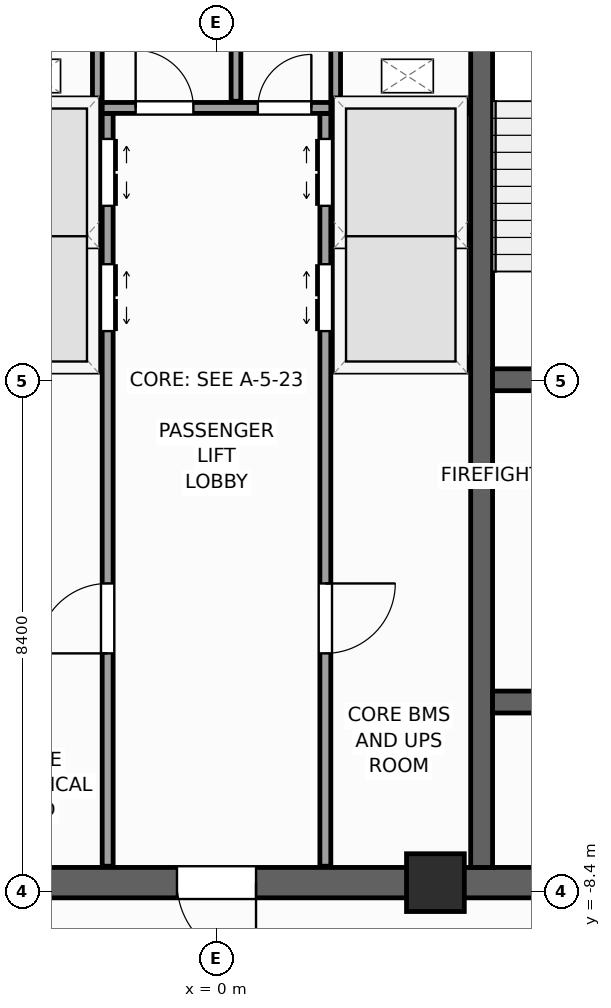
"""IFC4 building model, lengths in metres.
Left out: names, types, materials, properties, quantities, classifications, styles, units other than length and angle.
Written with IfcOpenShell. Run it as: python <this file> out.ifc"""

import sys

from ifc_helpers import new_model, si_unit, direction, frame, frame_2d, origin, origin_2d, place, context, subcontext, project, spatial, rectangle, extrude, source, transform, mapped, element, fill, save


model = new_model("IFC4")
c1 = context("Model", 3, precision=1e-05, world=origin(), true_north=direction((0.0, 1.0)))
c2 = subcontext(c1, "Body", "Model", "MODEL_VIEW")
j1 = project(units=[si_unit("LENGTHUNIT", "METRE"), si_unit("PLANEANGLEUNIT", "RADIAN")], contexts=[c1])
p1 = place(None, origin())
s1 = spatial("IfcSite", under=j1, at=p1, CompositionType="ELEMENT")
p2 = place(p1, origin())
s2 = spatial("IfcBuilding", under=s1, at=p2, CompositionType="ELEMENT")
p3 = place(p2, frame((0.0, 0.0, 248.5)))
s3 = spatial("IfcBuildingStorey", under=s2, at=p3, CompositionType="ELEMENT", Elevation=248.5)
p4 = place(p3, frame((-8.5, -8.25, 0.0), z_axis=(0.0, 0.0, 1.0), x_axis=(1.0, 0.0, 0.0)))
e1 = element("IfcWall", 1, at=p4, inside=s3, PredefinedType="SHEAR", context=c2, shape_type="SweptSolid", body=[
    extrude(rectangle(XDim=17.0, YDim=0.5, at=frame_2d((8.5, 0.0))), origin(), (0.0, 0.0, 1.0), 3.9),
])
p5 = place(p4, frame((7.85, 0.0, 0.0)))
e2 = element("IfcOpeningElement", 2, at=p5, cuts=e1, PredefinedType="OPENING", context=c2, shape_type="SweptSolid", body=[
    extrude(rectangle(XDim=1.3, YDim=2.2, at=frame_2d((0.65, 1.1))), frame((0.0, 0.26, 0.0), z_axis=(0.0, -1.0, 0.0), x_axis=(1.0, 0.0, 0.0)), (0.0, 0.0, 1.0), 0.52),
])
p6 = place(p3, frame((4.36, -8.0, 0.0), z_axis=(0.0, 0.0, 1.0), x_axis=(0.0, 1.0, 0.0)))
e3 = element("IfcWall", 3, at=p6, inside=s3, PredefinedType="SHEAR", context=c2, shape_type="SweptSolid", body=[
    extrude(rectangle(XDim=16.0, YDim=0.36, at=frame_2d((8.0, 0.0))), origin(), (0.0, 0.0, 1.0), 3.9),
])
p7 = place(p3, frame((4.54, 0.02, 0.0), z_axis=(0.0, 0.0, 1.0), x_axis=(1.0, 0.0, 0.0)))
e4 = element("IfcWall", 4, at=p7, inside=s3, PredefinedType="SHEAR", context=c2, shape_type="SweptSolid", body=[
    extrude(rectangle(XDim=3.46, YDim=0.36, at=frame_2d((1.73, 0.0))), origin(), (0.0, 0.0, 1.0), 3.9),
])
p8 = place(p7, frame((1.03, 0.0, 0.0)))
e5 = element("IfcOpeningElement", 5, at=p8, cuts=e4, PredefinedType="OPENING", context=c2, shape_type="SweptSolid", body=[
    extrude(rectangle(XDim=1.4, YDim=2.2, at=frame_2d((0.7, 1.1))), frame((0.0, 0.19, 0.0), z_axis=(0.0, -1.0, 0.0), x_axis=(1.0, 0.0, 0.0)), (0.0, 0.0, 1.0), 0.38),
])
p9 = place(p3, frame((4.54, -5.28, 0.0), z_axis=(0.0, 0.0, 1.0), x_axis=(1.0, 0.0, 0.0)))
e6 = element("IfcWall", 6, at=p9, inside=s3, PredefinedType="SHEAR", context=c2, shape_type="SweptSolid", body=[
    extrude(rectangle(XDim=3.46, YDim=0.36, at=frame_2d((1.73, 0.0))), origin(), (0.0, 0.0, 1.0), 3.9),
])
p10 = place(p9, frame((1.76, 0.0, 0.0)))
e7 = element("IfcOpeningElement", 7, at=p10, cuts=e6, PredefinedType="OPENING", context=c2, shape_type="SweptSolid", body=[
    extrude(rectangle(XDim=1.2, YDim=2.25, at=frame_2d((0.6, 1.125))), frame((0.0, 0.19, 0.0), z_axis=(0.0, -1.0, 0.0), x_axis=(1.0, 0.0, 0.0)), (0.0, 0.0, 1.0), 0.38),
])
m1 = source(origin(), c2, "Body", "SweptSolid", [
    extrude(rectangle(XDim=0.95, YDim=0.95, at=origin_2d()), origin(), (0.0, 0.0, 1.0), 3.9),
])
p11 = place(p3, frame((3.6, -8.25, 0.0), z_axis=(0.0, 0.0, 1.0), x_axis=(1.0, 0.0, 0.0)))
e8 = element("IfcColumn", 8, at=p11, inside=s3, PredefinedType="PILASTER", context=c2, shape_type="MappedRepresentation", body=[
    mapped(m1, transform((0.0, 0.0, 0.0), scale=1.0)),
])
p12 = place(p3, frame((-29.154, -6.733, 0.0), z_axis=(0.0, 0.0, 1.0), x_axis=(0.77714192302, -0.629325378072, 0.0)))
e9 = element("IfcWall", 9, at=p12, inside=s3, PredefinedType="STANDARD", context=c2, shape_type="SweptSolid", body=[
    extrude(rectangle(XDim=36.84, YDim=0.34, at=frame_2d((18.42, 0.0))), origin(), (0.0, 0.0, 1.0), 2.96),
])
p13 = place(p12, frame((3.721, 0.0, 0.48)))
e10 = element("IfcOpeningElement", 10, at=p13, cuts=e9, PredefinedType="OPENING", context=c2, shape_type="SweptSolid", body=[
    extrude(rectangle(XDim=1.4, YDim=2.4, at=frame_2d((0.7, 1.2))), frame((0.0, 0.18, 0.0), z_axis=(0.0, -1.0, 0.0), x_axis=(1.0, 0.0, 0.0)), (0.0, 0.0, 1.0), 0.36),
])
p14 = place(p12, frame((9.809, 0.0, 0.58)))
e11 = element("IfcOpeningElement", 11, at=p14, cuts=e9, PredefinedType="OPENING", context=c2, shape_type="SweptSolid", body=[
    extrude(rectangle(XDim=1.75, YDim=2.3, at=frame_2d((0.875, 1.15))), frame((0.0, 0.18, 0.0), z_axis=(0.0, -1.0, 0.0), x_axis=(1.0, 0.0, 0.0)), (0.0, 0.0, 1.0), 0.36),
])
p15 = place(p12, frame((16.058, 0.0, 0.58)))
e12 = element("IfcOpeningElement", 12, at=p15, cuts=e9, PredefinedType="OPENING", context=c2, shape_type="SweptSolid", body=[
    extrude(rectangle(XDim=1.75, YDim=2.3, at=frame_2d((0.875, 1.15))), frame((0.0, 0.18, 0.0), z_axis=(0.0, -1.0, 0.0), x_axis=(1.0, 0.0, 0.0)), (0.0, 0.0, 1.0), 0.36),
])
p16 = place(p12, frame((24.176, 0.0, 0.58)))
e13 = element("IfcOpeningElement", 13, at=p16, cuts=e9, PredefinedType="OPENING", context=c2, shape_type="SweptSolid", body=[
    extrude(rectangle(XDim=1.75, YDim=2.3, at=frame_2d((0.875, 1.15))), frame((0.0, 0.18, 0.0), z_axis=(0.0, -1.0, 0.0), x_axis=(1.0, 0.0, 0.0)), (0.0, 0.0, 1.0), 0.36),
])
p17 = place(p12, frame((30.232, 0.0, 0.48)))
e14 = element("IfcOpeningElement", 14, at=p17, cuts=e9, PredefinedType="OPENING", context=c2, shape_type="SweptSolid", body=[
    extrude(rectangle(XDim=1.4, YDim=2.4, at=frame_2d((0.7, 1.2))), frame((0.0, 0.18, 0.0), z_axis=(0.0, -1.0, 0.0), x_axis=(1.0, 0.0, 0.0)), (0.0, 0.0, 1.0), 0.36),
])
p18 = place(p3, frame((-1.79, -7.98, 0.0), z_axis=(0.0, 0.0, 1.0), x_axis=(0.0, 1.0, 0.0)))
e15 = element("IfcWall", 15, at=p18, inside=s3, PredefinedType="PARTITIONING", context=c2, shape_type="SweptSolid", body=[
    extrude(rectangle(XDim=12.38, YDim=0.18, at=frame_2d((6.19, 0.0))), origin(), (0.0, 0.0, 1.0), 3.66),
])
p19 = place(p18, frame((8.8, 0.0, 0.0)))
e16 = element("IfcOpeningElement", 16, at=p19, cuts=e15, PredefinedType="OPENING", context=c2, shape_type="SweptSolid", body=[
    extrude(rectangle(XDim=1.1, YDim=2.2, at=frame_2d((0.55, 1.1))), frame((0.0, 0.1, 0.0), z_axis=(0.0, -1.0, 0.0), x_axis=(1.0, 0.0, 0.0)), (0.0, 0.0, 1.0), 0.2),
])
p20 = place(p18, frame((10.86, 0.0, 0.0)))
e17 = element("IfcOpeningElement", 17, at=p20, cuts=e15, PredefinedType="OPENING", context=c2, shape_type="SweptSolid", body=[
    extrude(rectangle(XDim=1.1, YDim=2.2, at=frame_2d((0.55, 1.1))), frame((0.0, 0.1, 0.0), z_axis=(0.0, -1.0, 0.0), x_axis=(1.0, 0.0, 0.0)), (0.0, 0.0, 1.0), 0.2),
])
p21 = place(p18, frame((3.5, 0.0, 0.0)))
e18 = element("IfcOpeningElement", 18, at=p21, cuts=e15, PredefinedType="OPENING", context=c2, shape_type="SweptSolid", body=[
    extrude(rectangle(XDim=1.15, YDim=2.25, at=frame_2d((0.575, 1.125))), frame((0.0, 0.1, 0.0), z_axis=(0.0, -1.0, 0.0), x_axis=(1.0, 0.0, 0.0)), (0.0, 0.0, 1.0), 0.2),
])
p22 = place(p3, frame((1.79, -7.98, 0.0), z_axis=(0.0, 0.0, 1.0), x_axis=(0.0, 1.0, 0.0)))
e19 = element("IfcWall", 19, at=p22, inside=s3, PredefinedType="PARTITIONING", context=c2, shape_type="SweptSolid", body=[
    extrude(rectangle(XDim=12.38, YDim=0.18, at=frame_2d((6.19, 0.0))), origin(), (0.0, 0.0, 1.0), 3.66),
])
p23 = place(p22, frame((8.8, 0.0, 0.0)))
e20 = element("IfcOpeningElement", 20, at=p23, cuts=e19, PredefinedType="OPENING", context=c2, shape_type="SweptSolid", body=[
    extrude(rectangle(XDim=1.1, YDim=2.2, at=frame_2d((0.55, 1.1))), frame((0.0, 0.1, 0.0), z_axis=(0.0, -1.0, 0.0), x_axis=(1.0, 0.0, 0.0)), (0.0, 0.0, 1.0), 0.2),
])
p24 = place(p22, frame((10.86, 0.0, 0.0)))
e21 = element("IfcOpeningElement", 21, at=p24, cuts=e19, PredefinedType="OPENING", context=c2, shape_type="SweptSolid", body=[
    extrude(rectangle(XDim=1.1, YDim=2.2, at=frame_2d((0.55, 1.1))), frame((0.0, 0.1, 0.0), z_axis=(0.0, -1.0, 0.0), x_axis=(1.0, 0.0, 0.0)), (0.0, 0.0, 1.0), 0.2),
])
p25 = place(p22, frame((3.5, 0.0, 0.0)))
e22 = element("IfcOpeningElement", 22, at=p25, cuts=e19, PredefinedType="OPENING", context=c2, shape_type="SweptSolid", body=[
    extrude(rectangle(XDim=1.15, YDim=2.25, at=frame_2d((0.575, 1.125))), frame((0.0, 0.1, 0.0), z_axis=(0.0, -1.0, 0.0), x_axis=(1.0, 0.0, 0.0)), (0.0, 0.0, 1.0), 0.2),
])
p26 = place(p3, frame((-1.88, 4.49, 0.0), z_axis=(0.0, 0.0, 1.0), x_axis=(1.0, 0.0, 0.0)))
e23 = element("IfcWall", 23, at=p26, inside=s3, PredefinedType="PARTITIONING", context=c2, shape_type="SweptSolid", body=[
    extrude(rectangle(XDim=3.76, YDim=0.18, at=frame_2d((1.88, 0.0))), origin(), (0.0, 0.0, 1.0), 3.66),
])
p27 = place(p26, frame((0.55, 0.0, 0.0)))
e24 = element("IfcOpeningElement", 24, at=p27, cuts=e23, PredefinedType="OPENING", context=c2, shape_type="SweptSolid", body=[
    extrude(rectangle(XDim=0.95, YDim=2.1, at=frame_2d((0.475, 1.05))), frame((0.0, 0.1, 0.0), z_axis=(0.0, -1.0, 0.0), x_axis=(1.0, 0.0, 0.0)), (0.0, 0.0, 1.0), 0.2),
])
p28 = place(p26, frame((2.56, 0.0, 0.0)))
e25 = element("IfcOpeningElement", 25, at=p28, cuts=e23, PredefinedType="OPENING", context=c2, shape_type="SweptSolid", body=[
    extrude(rectangle(XDim=0.88, YDim=2.1, at=frame_2d((0.44, 1.05))), frame((0.0, 0.1, 0.0), z_axis=(0.0, -1.0, 0.0), x_axis=(1.0, 0.0, 0.0)), (0.0, 0.0, 1.0), 0.2),
])
for number, where, z_axis, x_axis in (
    (26, (-4.17, 0.3, 0.0), (0.0, 0.0, 1.0), (1.0, 0.0, 0.0)),
    (27, (1.89, 0.3, 0.0), (0.0, 0.0, 1.0), (1.0, 0.0, 0.0)),
    (28, (-4.17, 4.49, 0.0), (0.0, 0.0, 1.0), (1.0, 0.0, 0.0)),
    (29, (1.89, 4.49, 0.0), (0.0, 0.0, 1.0), (1.0, 0.0, 0.0)),
):
    element("IfcWall", number, at=place(p3, frame(where, z_axis=z_axis, x_axis=x_axis)), inside=s3, PredefinedType="PARTITIONING", context=c2, shape_type="SweptSolid", body=[
        extrude(rectangle(XDim=2.28, YDim=0.18, at=frame_2d((1.14, 0.0))), origin(), (0.0, 0.0, 1.0), 3.66),
    ])
for number, where, z_axis, x_axis in (
    (30, (-4.16, 2.4, 0.0), (0.0, 0.0, 1.0), (1.0, 0.0, 0.0)),
    (31, (1.9, 2.4, 0.0), (0.0, 0.0, 1.0), (1.0, 0.0, 0.0)),
):
    element("IfcWall", number, at=place(p3, frame(where, z_axis=z_axis, x_axis=x_axis)), inside=s3, PredefinedType="PARTITIONING", context=c2, shape_type="SweptSolid", body=[
        extrude(rectangle(XDim=2.26, YDim=0.12, at=frame_2d((1.13, 0.0))), origin(), (0.0, 0.0, 1.0), 3.66),
    ])
for number, where, z_axis, x_axis in (
    (32, (-1.96, 4.58, 0.0), (0.0, 0.0, 1.0), (0.0, 1.0, 0.0)),
    (33, (1.96, 4.58, 0.0), (0.0, 0.0, 1.0), (0.0, 1.0, 0.0)),
):
    element("IfcWall", number, at=place(p3, frame(where, z_axis=z_axis, x_axis=x_axis)), inside=s3, PredefinedType="PARTITIONING", context=c2, shape_type="SweptSolid", body=[
        extrude(rectangle(XDim=3.4, YDim=0.16, at=frame_2d((1.7, 0.0))), origin(), (0.0, 0.0, 1.0), 3.66),
    ])
p29 = place(p3, frame((0.32, 4.6, 0.0), z_axis=(0.0, 0.0, 1.0), x_axis=(0.0, 1.0, 0.0)))
e34 = element("IfcWall", 34, at=p29, inside=s3, PredefinedType="PARTITIONING", context=c2, shape_type="SweptSolid", body=[
    extrude(rectangle(XDim=1.95, YDim=0.16, at=frame_2d((0.975, 0.0))), origin(), (0.0, 0.0, 1.0), 3.66),
])
m2 = source(origin(), c2, "Body", "SweptSolid", [
    extrude(rectangle(XDim=1.3, YDim=2.2, at=frame_2d((0.65, 1.1))), frame((0.0, 0.025, 0.0), z_axis=(0.0, -1.0, 0.0), x_axis=(1.0, 0.0, 0.0)), (0.0, 0.0, 1.0), 0.05),
])
p30 = place(p5, frame((1.3, 0.0, 0.0), z_axis=(0.0, 0.0, 1.0), x_axis=(-1.0, 0.0, 0.0)))
e35 = element("IfcDoor", 35, at=p30, inside=s3, OperationType="SINGLE_SWING_RIGHT", PredefinedType="DOOR", context=c2, shape_type="MappedRepresentation", body=[
    mapped(m2, transform((0.0, 0.0, 0.0), scale=1.0)),
])
fill(e2, e35)
m3 = source(origin(), c2, "Body", "SweptSolid", [
    extrude(rectangle(XDim=1.1, YDim=2.2, at=frame_2d((0.55, 1.1))), frame((0.0, 0.025, 0.0), z_axis=(0.0, -1.0, 0.0), x_axis=(1.0, 0.0, 0.0)), (0.0, 0.0, 1.0), 0.05),
])
p31 = place(p19, frame((1.1, 0.0, 0.0), z_axis=(0.0, 0.0, 1.0), x_axis=(-1.0, 0.0, 0.0)))
e36 = element("IfcDoor", 36, at=p31, inside=s3, OperationType="DOUBLE_DOOR_SLIDING", PredefinedType="DOOR", context=c2, shape_type="MappedRepresentation", body=[
    mapped(m3, transform((0.0, 0.0, 0.0), scale=1.0)),
])
fill(e16, e36)
p32 = place(p20, frame((1.1, 0.0, 0.0), z_axis=(0.0, 0.0, 1.0), x_axis=(-1.0, 0.0, 0.0)))
e37 = element("IfcDoor", 37, at=p32, inside=s3, OperationType="DOUBLE_DOOR_SLIDING", PredefinedType="DOOR", context=c2, shape_type="MappedRepresentation", body=[
    mapped(m3, transform((0.0, 0.0, 0.0), scale=1.0)),
])
fill(e17, e37)
p33 = place(p23, origin())
e38 = element("IfcDoor", 38, at=p33, inside=s3, OperationType="DOUBLE_DOOR_SLIDING", PredefinedType="DOOR", context=c2, shape_type="MappedRepresentation", body=[
    mapped(m3, transform((0.0, 0.0, 0.0), scale=1.0)),
])
fill(e20, e38)
p34 = place(p24, origin())
e39 = element("IfcDoor", 39, at=p34, inside=s3, OperationType="DOUBLE_DOOR_SLIDING", PredefinedType="DOOR", context=c2, shape_type="MappedRepresentation", body=[
    mapped(m3, transform((0.0, 0.0, 0.0), scale=1.0)),
])
fill(e21, e39)
m4 = source(origin(), c2, "Body", "SweptSolid", [
    extrude(rectangle(XDim=1.15, YDim=2.25, at=frame_2d((0.575, 1.125))), frame((0.0, 0.025, 0.0), z_axis=(0.0, -1.0, 0.0), x_axis=(1.0, 0.0, 0.0)), (0.0, 0.0, 1.0), 0.05),
])
p35 = place(p21, origin())
e40 = element("IfcDoor", 40, at=p35, inside=s3, OperationType="SINGLE_SWING_LEFT", PredefinedType="DOOR", context=c2, shape_type="MappedRepresentation", body=[
    mapped(m4, transform((0.0, 0.0, 0.0), scale=1.0)),
])
fill(e18, e40)
p36 = place(p25, frame((1.15, 0.0, 0.0), z_axis=(0.0, 0.0, 1.0), x_axis=(-1.0, 0.0, 0.0)))
e41 = element("IfcDoor", 41, at=p36, inside=s3, OperationType="SINGLE_SWING_RIGHT", PredefinedType="DOOR", context=c2, shape_type="MappedRepresentation", body=[
    mapped(m4, transform((0.0, 0.0, 0.0), scale=1.0)),
])
fill(e22, e41)
m5 = source(origin(), c2, "Body", "SweptSolid", [
    extrude(rectangle(XDim=0.95, YDim=2.1, at=frame_2d((0.475, 1.05))), frame((0.0, 0.025, 0.0), z_axis=(0.0, -1.0, 0.0), x_axis=(1.0, 0.0, 0.0)), (0.0, 0.0, 1.0), 0.05),
])
p37 = place(p27, origin())
e42 = element("IfcDoor", 42, at=p37, inside=s3, OperationType="SINGLE_SWING_LEFT", PredefinedType="DOOR", context=c2, shape_type="MappedRepresentation", body=[
    mapped(m5, transform((0.0, 0.0, 0.0), scale=1.0)),
])
fill(e24, e42)
m6 = source(origin(), c2, "Body", "SweptSolid", [
    extrude(rectangle(XDim=0.88, YDim=2.1, at=frame_2d((0.44, 1.05))), frame((0.0, 0.025, 0.0), z_axis=(0.0, -1.0, 0.0), x_axis=(1.0, 0.0, 0.0)), (0.0, 0.0, 1.0), 0.05),
])
p38 = place(p28, origin())
e43 = element("IfcDoor", 43, at=p38, inside=s3, OperationType="SINGLE_SWING_RIGHT", PredefinedType="DOOR", context=c2, shape_type="MappedRepresentation", body=[
    mapped(m6, transform((0.0, 0.0, 0.0), scale=1.0)),
])
fill(e25, e43)
save(model, sys.argv[1])
